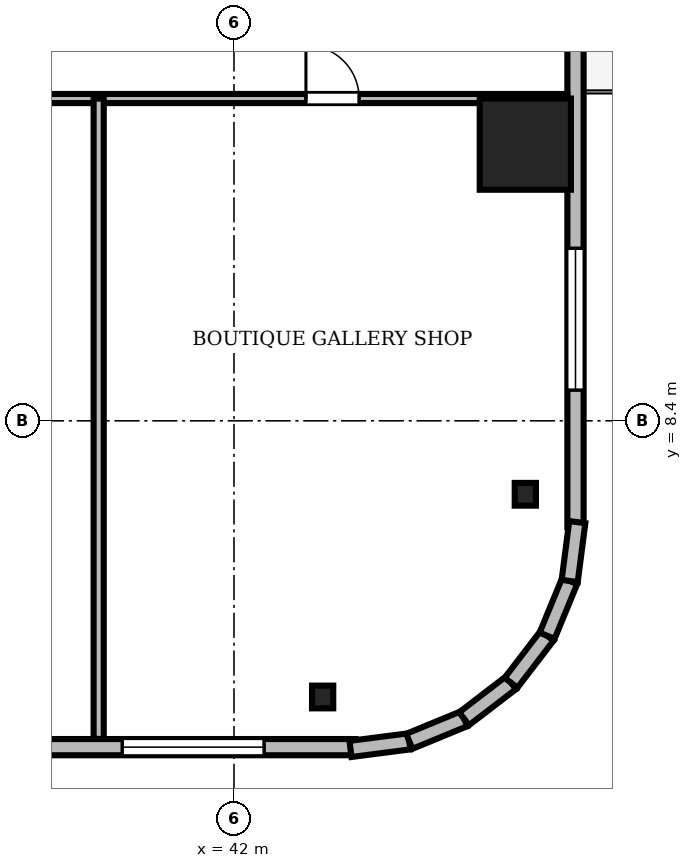
"""IFC4 building model, lengths in metres.
Left out: names, types, materials, properties, quantities, classifications, styles, units other than length and angle.
Written with IfcOpenShell. Run it as: python <this file> out.ifc"""

import sys

from ifc_helpers import new_model, si_unit, direction, frame, frame_2d, origin, origin_2d, place, context, subcontext, project, spatial, rectangle, i_section, extrude, source, transform, mapped, element, fill, save


model = new_model("IFC4")
c1 = context("Model", 3, precision=1e-05, world=origin(), true_north=direction((0.0, 1.0)))
c2 = subcontext(c1, "Body", "Model", "MODEL_VIEW")
j1 = project(units=[si_unit("LENGTHUNIT", "METRE"), si_unit("PLANEANGLEUNIT", "RADIAN")], contexts=[c1])
p1 = place(None, origin())
s1 = spatial("IfcSite", under=j1, at=p1, CompositionType="ELEMENT")
p2 = place(p1, origin())
s2 = spatial("IfcBuilding", under=s1, at=p2, CompositionType="ELEMENT")
p3 = place(p2, frame((0.0, 0.0, 78.7)))
s3 = spatial("IfcBuildingStorey", under=s2, at=p3, CompositionType="ELEMENT", Elevation=78.7)
m1 = source(origin(), c2, "Body", "SweptSolid", [
    extrude(rectangle(XDim=1.8, YDim=1.8, at=origin_2d()), origin(), (0.0, 0.0, 1.0), 3.41),
])
p4 = place(p3, frame((47.75, 13.86, 0.0), z_axis=(0.0, 0.0, 1.0), x_axis=(1.0, 0.0, 0.0)))
e1 = element("IfcColumn", 1, at=p4, inside=s3, PredefinedType="COLUMN", context=c2, shape_type="MappedRepresentation", body=[
    mapped(m1, transform((0.0, 0.0, 0.0), scale=1.0)),
])
m2 = source(origin(), c2, "Body", "SweptSolid", [
    extrude(i_section(OverallWidth=0.419, OverallDepth=0.449, WebThickness=0.031, FlangeThickness=0.048, FilletRadius=0.015, at=origin_2d()), origin(), (0.0, 0.0, 1.0), 3.41),
])
for number, where, z_axis, x_axis in (
    (2, (43.75, 2.95, 0.0), (0.0, 0.0, 1.0), (1.0, 0.0, 0.0)),
    (3, (47.75, 6.95, 0.0), (0.0, 0.0, 1.0), (1.0, 0.0, 0.0)),
):
    element("IfcColumn", number, at=place(p3, frame(where, z_axis=z_axis, x_axis=x_axis)), inside=s3, PredefinedType="COLUMN", context=c2, shape_type="MappedRepresentation", body=[
        mapped(m2, transform((0.0, 0.0, 0.0), scale=1.0)),
    ])
m3 = source(origin(), c2, "Body", "SweptSolid", [
    extrude(rectangle(XDim=15.6, YDim=0.32, at=frame_2d((7.8, 0.0))), origin(), (0.0, 0.0, 1.0), 3.41),
])
p5 = place(p3, frame((28.8, 1.96, 0.0), z_axis=(0.0, 0.0, 1.0), x_axis=(1.0, 0.0, 0.0)))
e4 = element("IfcWall", 4, at=p5, inside=s3, PredefinedType="SOLIDWALL", context=c2, shape_type="MappedRepresentation", body=[
    mapped(m3, transform((0.0, 0.0, 0.0), scale=1.0)),
])
m4 = source(origin(), c2, "Body", "SweptSolid", [
    extrude(rectangle(XDim=2.8, YDim=2.4, at=frame_2d((1.4, 1.2))), frame((0.0, 0.17, 0.0), z_axis=(0.0, -1.0, 0.0), x_axis=(1.0, 0.0, 0.0)), (0.0, 0.0, 1.0), 0.34),
])
p6 = place(p5, frame((10.995, 0.0, 0.72)))
e5 = element("IfcOpeningElement", 5, at=p6, cuts=e4, PredefinedType="OPENING", context=c2, shape_type="MappedRepresentation", body=[
    mapped(m4, transform((0.0, 0.0, 0.0), scale=1.0)),
])
p7 = place(p3, frame((48.74, 6.3, 0.0), z_axis=(0.0, 0.0, 1.0), x_axis=(0.0, 1.0, 0.0)))
e6 = element("IfcWall", 6, at=p7, inside=s3, PredefinedType="SOLIDWALL", context=c2, shape_type="MappedRepresentation", body=[
    mapped(m3, transform((0.0, 0.0, 0.0), scale=1.0)),
])
m5 = source(origin(), c2, "Body", "SweptSolid", [
    extrude(rectangle(XDim=1.4, YDim=2.3, at=frame_2d((0.7, 1.15))), frame((0.0, 0.17, 0.0), z_axis=(0.0, -1.0, 0.0), x_axis=(1.0, 0.0, 0.0)), (0.0, 0.0, 1.0), 0.34),
])
p8 = place(p7, frame((9.61, 0.0, 0.0)))
e7 = element("IfcOpeningElement", 7, at=p8, cuts=e6, PredefinedType="OPENING", context=c2, shape_type="MappedRepresentation", body=[
    mapped(m5, transform((0.0, 0.0, 0.0), scale=1.0)),
])
p9 = place(p7, frame((2.705, 0.0, 0.72)))
e8 = element("IfcOpeningElement", 8, at=p9, cuts=e6, PredefinedType="OPENING", context=c2, shape_type="MappedRepresentation", body=[
    mapped(m4, transform((0.0, 0.0, 0.0), scale=1.0)),
])
m6 = source(origin(), c2, "Body", "SweptSolid", [
    extrude(rectangle(XDim=1.17, YDim=0.32, at=frame_2d((0.585, 0.0))), origin(), (0.0, 0.0, 1.0), 3.41),
])
p10 = place(p3, frame((44.3, 1.925, 0.0), z_axis=(0.0, 0.0, 1.0), x_axis=(0.991762485493, 0.128090485085, 0.0)))
e9 = element("IfcWall", 9, at=p10, inside=s3, PredefinedType="SOLIDWALL", context=c2, shape_type="MappedRepresentation", body=[
    mapped(m6, transform((0.0, 0.0, 0.0), scale=1.0)),
])
m7 = source(origin(), c2, "Body", "SweptSolid", [
    extrude(rectangle(XDim=1.169, YDim=0.32, at=frame_2d((0.585, 0.0))), origin(), (0.0, 0.0, 1.0), 3.41),
])
p11 = place(p3, frame((45.46, 2.074, 0.0), z_axis=(0.0, 0.0, 1.0), x_axis=(0.924479075121, 0.381232789334, 0.0)))
e10 = element("IfcWall", 10, at=p11, inside=s3, PredefinedType="SOLIDWALL", context=c2, shape_type="MappedRepresentation", body=[
    mapped(m7, transform((0.0, 0.0, 0.0), scale=1.0)),
])
m8 = source(origin(), c2, "Body", "SweptSolid", [
    extrude(rectangle(XDim=1.169, YDim=0.32, at=frame_2d((0.584, 0.0))), origin(), (0.0, 0.0, 1.0), 3.41),
])
p12 = place(p3, frame((46.541, 2.52, 0.0), z_axis=(0.0, 0.0, 1.0), x_axis=(0.793663520347, 0.608356981114, 0.0)))
e11 = element("IfcWall", 11, at=p12, inside=s3, PredefinedType="SOLIDWALL", context=c2, shape_type="MappedRepresentation", body=[
    mapped(m8, transform((0.0, 0.0, 0.0), scale=1.0)),
])
m9 = source(origin(), c2, "Body", "SweptSolid", [
    extrude(rectangle(XDim=1.169, YDim=0.32, at=frame_2d((0.584, 0.0))), origin(), (0.0, 0.0, 1.0), 3.41),
])
for number, where, z_axis, x_axis in (
    (12, (47.469, 3.231, 0.0), (0.0, 0.0, 1.0), (0.608, 0.794, 0.0)),
    (13, (48.18, 4.159, 0.0), (0.0, 0.0, 1.0), (0.381, 0.925, 0.0)),
):
    element("IfcWall", number, at=place(p3, frame(where, z_axis=z_axis, x_axis=x_axis)), inside=s3, PredefinedType="SOLIDWALL", context=c2, shape_type="MappedRepresentation", body=[
        mapped(m9, transform((0.0, 0.0, 0.0), scale=1.0)),
    ])
m10 = source(origin(), c2, "Body", "SweptSolid", [
    extrude(rectangle(XDim=1.171, YDim=0.32, at=frame_2d((0.585, 0.0))), origin(), (0.0, 0.0, 1.0), 3.41),
])
p13 = place(p3, frame((48.625, 5.24, 0.0), z_axis=(0.0, 0.0, 1.0), x_axis=(0.128269133229, 0.991739395941, 0.0)))
e14 = element("IfcWall", 14, at=p13, inside=s3, PredefinedType="SOLIDWALL", context=c2, shape_type="MappedRepresentation", body=[
    mapped(m10, transform((0.0, 0.0, 0.0), scale=1.0)),
])
m11 = source(origin(), c2, "Body", "SweptSolid", [
    extrude(rectangle(XDim=46.156, YDim=0.18, at=frame_2d((23.078, 0.0))), origin(), (0.0, 0.0, 1.0), 2.652),
])
p14 = place(p3, frame((2.422, 14.76, 0.0), z_axis=(0.0, 0.0, 1.0), x_axis=(1.0, 0.0, 0.0)))
e15 = element("IfcWall", 15, at=p14, inside=s3, PredefinedType="PARTITIONING", context=c2, shape_type="MappedRepresentation", body=[
    mapped(m11, transform((0.0, 0.0, 0.0), scale=1.0)),
])
m12 = source(origin(), c2, "Body", "SweptSolid", [
    extrude(rectangle(XDim=1.05, YDim=2.2, at=frame_2d((0.525, 1.1))), frame((0.0, 0.1, 0.0), z_axis=(0.0, -1.0, 0.0), x_axis=(1.0, 0.0, 0.0)), (0.0, 0.0, 1.0), 0.2),
])
p15 = place(p14, frame((15.148, 0.0, 0.0)))
e16 = element("IfcOpeningElement", 16, at=p15, cuts=e15, PredefinedType="OPENING", context=c2, shape_type="MappedRepresentation", body=[
    mapped(m12, transform((0.0, 0.0, 0.0), scale=1.0)),
])
p16 = place(p14, frame((19.38, 0.0, 0.0)))
e17 = element("IfcOpeningElement", 17, at=p16, cuts=e15, PredefinedType="OPENING", context=c2, shape_type="MappedRepresentation", body=[
    mapped(m12, transform((0.0, 0.0, 0.0), scale=1.0)),
])
p17 = place(p14, frame((26.183, 0.0, 0.0)))
e18 = element("IfcOpeningElement", 18, at=p17, cuts=e15, PredefinedType="OPENING", context=c2, shape_type="MappedRepresentation", body=[
    mapped(m12, transform((0.0, 0.0, 0.0), scale=1.0)),
])
p18 = place(p14, frame((32.986, 0.0, 0.0)))
e19 = element("IfcOpeningElement", 19, at=p18, cuts=e15, PredefinedType="OPENING", context=c2, shape_type="MappedRepresentation", body=[
    mapped(m12, transform((0.0, 0.0, 0.0), scale=1.0)),
])
p19 = place(p14, frame((40.998, 0.0, 0.0)))
e20 = element("IfcOpeningElement", 20, at=p19, cuts=e15, PredefinedType="OPENING", context=c2, shape_type="MappedRepresentation", body=[
    mapped(m12, transform((0.0, 0.0, 0.0), scale=1.0)),
])
m13 = source(origin(), c2, "Body", "SweptSolid", [
    extrude(rectangle(XDim=12.638, YDim=0.2, at=frame_2d((6.319, 0.0))), origin(), (0.0, 0.0, 1.0), 2.652),
])
p20 = place(p3, frame((39.33, 2.122, 0.0), z_axis=(0.0, 0.0, 1.0), x_axis=(0.0, 1.0, 0.0)))
e21 = element("IfcWall", 21, at=p20, inside=s3, PredefinedType="PARTITIONING", context=c2, shape_type="MappedRepresentation", body=[
    mapped(m13, transform((0.0, 0.0, 0.0), scale=1.0)),
])
m14 = source(origin(), c2, "Body", "SweptSolid", [
    extrude(rectangle(XDim=2.8, YDim=2.4, at=frame_2d((1.4, 1.2))), frame((0.0, 0.03, 0.0), z_axis=(0.0, -1.0, 0.0), x_axis=(1.0, 0.0, 0.0)), (0.0, 0.0, 1.0), 0.06),
])
p21 = place(p6, origin())
e22 = element("IfcWindow", 22, at=p21, inside=s3, PartitioningType="SINGLE_PANEL", PredefinedType="WINDOW", context=c2, shape_type="MappedRepresentation", body=[
    mapped(m14, transform((0.0, 0.0, 0.0), scale=1.0)),
])
fill(e5, e22)
p22 = place(p9, origin())
e23 = element("IfcWindow", 23, at=p22, inside=s3, PartitioningType="SINGLE_PANEL", PredefinedType="WINDOW", context=c2, shape_type="MappedRepresentation", body=[
    mapped(m14, transform((0.0, 0.0, 0.0), scale=1.0)),
])
fill(e8, e23)
m15 = source(origin(), c2, "Body", "SweptSolid", [
    extrude(rectangle(XDim=1.05, YDim=2.2, at=frame_2d((0.525, 1.1))), frame((0.0, 0.025, 0.0), z_axis=(0.0, -1.0, 0.0), x_axis=(1.0, 0.0, 0.0)), (0.0, 0.0, 1.0), 0.05),
])
p23 = place(p19, origin())
e24 = element("IfcDoor", 24, at=p23, inside=s3, OperationType="SINGLE_SWING_LEFT", PredefinedType="DOOR", context=c2, shape_type="MappedRepresentation", body=[
    mapped(m15, transform((0.0, 0.0, 0.0), scale=1.0)),
])
fill(e20, e24)
save(model, sys.argv[1])
